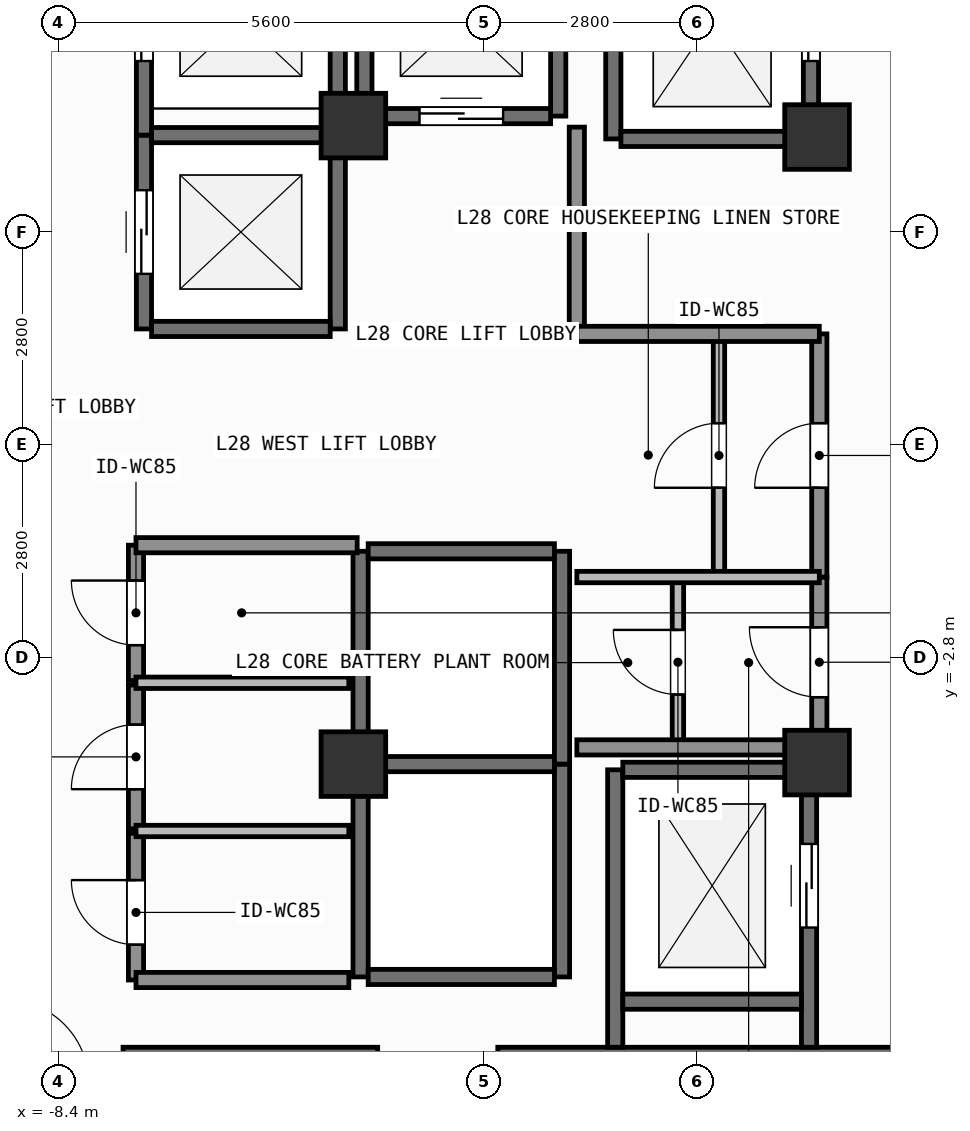
"""IFC4 building model, lengths in metres.
Left out: names, types, materials, properties, quantities, classifications, styles, units other than length and angle.
Written with IfcOpenShell. Run it as: python <this file> out.ifc"""

import sys

from ifc_helpers import new_model, si_unit, direction, frame, frame_2d, origin, origin_2d, place, context, subcontext, project, spatial, rectangle, extrude, element, fill, save


model = new_model("IFC4")
c1 = context("Model", 3, precision=1e-05, world=origin(), true_north=direction((0.0, 1.0)))
c2 = subcontext(c1, "Body", "Model", "MODEL_VIEW")
j1 = project(units=[si_unit("LENGTHUNIT", "METRE"), si_unit("PLANEANGLEUNIT", "RADIAN")], contexts=[c1])
p1 = place(None, origin())
s1 = spatial("IfcSite", under=j1, at=p1, CompositionType="ELEMENT")
p2 = place(p1, origin())
s2 = spatial("IfcBuilding", under=s1, at=p2, CompositionType="ELEMENT")
p3 = place(p2, frame((0.0, 0.0, 113.4)))
s3 = spatial("IfcBuildingStorey", under=s2, at=p3, CompositionType="ELEMENT", Elevation=113.4)
p4 = place(p3, frame((-7.55, -8.4, 0.0), z_axis=(0.0, 0.0, 1.0), x_axis=(1.0, 0.0, 0.0)))
e1 = element("IfcWall", 1, at=p4, inside=s3, PredefinedType="SHEAR", context=c2, shape_type="SweptSolid", body=[
    extrude(rectangle(XDim=3.35, YDim=0.95, at=frame_2d((1.675, 0.0))), origin(), (0.0, 0.0, 1.0), 3.9),
])
p5 = place(p3, frame((-2.62, -8.4, 0.0), z_axis=(0.0, 0.0, 1.0), x_axis=(1.0, 0.0, 0.0)))
e2 = element("IfcWall", 2, at=p5, inside=s3, PredefinedType="SHEAR", context=c2, shape_type="SweptSolid", body=[
    extrude(rectangle(XDim=7.27, YDim=0.95, at=frame_2d((3.635, 0.0))), origin(), (0.0, 0.0, 1.0), 3.9),
])
for number, where, z_axis, x_axis in (
    (3, (-4.52, -4.2, 0.0), (0.0, 0.0, 1.0), (1.0, 0.0, 0.0)),
    (4, (1.58, -4.18, 0.0), (0.0, 0.0, 1.0), (1.0, 0.0, 0.0)),
    (5, (1.58, 4.05, 0.0), (0.0, 0.0, 1.0), (1.0, 0.0, 0.0)),
    (6, (-4.52, 4.2, 0.0), (0.0, 0.0, 1.0), (1.0, 0.0, 0.0)),
):
    element("IfcColumn", number, at=place(p3, frame(where, z_axis=z_axis, x_axis=x_axis)), inside=s3, PredefinedType="COLUMN", context=c2, shape_type="SweptSolid", body=[
        extrude(rectangle(XDim=0.85, YDim=0.85, at=origin_2d()), origin(), (0.0, 0.0, 1.0), 3.9),
    ])
p6 = place(p3, frame((-7.275, 1.525, 0.0), z_axis=(0.0, 0.0, 1.0), x_axis=(0.0, 1.0, 0.0)))
e7 = element("IfcWall", 7, at=p6, inside=s3, PredefinedType="SHEAR", context=c2, shape_type="SweptSolid", body=[
    extrude(rectangle(XDim=2.55, YDim=0.2, at=frame_2d((1.275, 0.0))), origin(), (0.0, 0.0, 1.0), 3.68),
])
p7 = place(p6, frame((0.725, 0.0, 0.0)))
e8 = element("IfcOpeningElement", 8, at=p7, cuts=e7, PredefinedType="OPENING", context=c2, shape_type="SweptSolid", body=[
    extrude(rectangle(XDim=1.1, YDim=2.2, at=frame_2d((0.55, 1.1))), frame((0.0, 0.11, 0.0), z_axis=(0.0, -1.0, 0.0), x_axis=(1.0, 0.0, 0.0)), (0.0, 0.0, 1.0), 0.22),
])
p8 = place(p3, frame((-4.725, 1.525, 0.0), z_axis=(0.0, 0.0, 1.0), x_axis=(0.0, 1.0, 0.0)))
e9 = element("IfcWall", 9, at=p8, inside=s3, PredefinedType="SHEAR", context=c2, shape_type="SweptSolid", body=[
    extrude(rectangle(XDim=2.55, YDim=0.2, at=frame_2d((1.275, 0.0))), origin(), (0.0, 0.0, 1.0), 3.68),
])
for number, where, z_axis, x_axis in (
    (10, (-7.175, 1.525, 0.0), (0.0, 0.0, 1.0), (1.0, 0.0, 0.0)),
    (11, (-7.175, 4.075, 0.0), (0.0, 0.0, 1.0), (1.0, 0.0, 0.0)),
):
    element("IfcWall", number, at=place(p3, frame(where, z_axis=z_axis, x_axis=x_axis)), inside=s3, PredefinedType="SHEAR", context=c2, shape_type="SweptSolid", body=[
        extrude(rectangle(XDim=2.35, YDim=0.2, at=frame_2d((1.175, 0.0))), origin(), (0.0, 0.0, 1.0), 3.68),
    ])
p9 = place(p3, frame((-7.275, 4.075, 0.0), z_axis=(0.0, 0.0, 1.0), x_axis=(0.0, 1.0, 0.0)))
e12 = element("IfcWall", 12, at=p9, inside=s3, PredefinedType="SHEAR", context=c2, shape_type="SweptSolid", body=[
    extrude(rectangle(XDim=2.8, YDim=0.2, at=frame_2d((1.4, 0.0))), origin(), (0.0, 0.0, 1.0), 3.68),
])
p10 = place(p9, frame((0.975, 0.0, 0.0)))
e13 = element("IfcOpeningElement", 13, at=p10, cuts=e12, PredefinedType="OPENING", context=c2, shape_type="SweptSolid", body=[
    extrude(rectangle(XDim=1.1, YDim=2.2, at=frame_2d((0.55, 1.1))), frame((0.0, 0.11, 0.0), z_axis=(0.0, -1.0, 0.0), x_axis=(1.0, 0.0, 0.0)), (0.0, 0.0, 1.0), 0.22),
])
p11 = place(p3, frame((-4.725, 4.075, 0.0), z_axis=(0.0, 0.0, 1.0), x_axis=(0.0, 1.0, 0.0)))
e14 = element("IfcWall", 14, at=p11, inside=s3, PredefinedType="SHEAR", context=c2, shape_type="SweptSolid", body=[
    extrude(rectangle(XDim=2.8, YDim=0.2, at=frame_2d((1.4, 0.0))), origin(), (0.0, 0.0, 1.0), 3.68),
])
for number, where, z_axis, x_axis in (
    (15, (-4.375, 4.325, 0.0), (0.0, 0.0, 1.0), (0.0, 1.0, 0.0)),
    (16, (-1.825, 4.325, 0.0), (0.0, 0.0, 1.0), (0.0, 1.0, 0.0)),
):
    element("IfcWall", number, at=place(p3, frame(where, z_axis=z_axis, x_axis=x_axis)), inside=s3, PredefinedType="SHEAR", context=c2, shape_type="SweptSolid", body=[
        extrude(rectangle(XDim=2.55, YDim=0.2, at=frame_2d((1.275, 0.0))), origin(), (0.0, 0.0, 1.0), 3.68),
    ])
p12 = place(p3, frame((-4.275, 4.325, 0.0), z_axis=(0.0, 0.0, 1.0), x_axis=(1.0, 0.0, 0.0)))
e17 = element("IfcWall", 17, at=p12, inside=s3, PredefinedType="SHEAR", context=c2, shape_type="SweptSolid", body=[
    extrude(rectangle(XDim=2.35, YDim=0.2, at=frame_2d((1.175, 0.0))), origin(), (0.0, 0.0, 1.0), 3.68),
])
p13 = place(p12, frame((0.625, 0.0, 0.0)))
e18 = element("IfcOpeningElement", 18, at=p13, cuts=e17, PredefinedType="OPENING", context=c2, shape_type="SweptSolid", body=[
    extrude(rectangle(XDim=1.1, YDim=2.2, at=frame_2d((0.55, 1.1))), frame((0.0, 0.11, 0.0), z_axis=(0.0, -1.0, 0.0), x_axis=(1.0, 0.0, 0.0)), (0.0, 0.0, 1.0), 0.22),
])
for number, where, z_axis, x_axis in (
    (19, (-4.425, -7.0, 0.0), (0.0, 0.0, 1.0), (0.0, 1.0, 0.0)),
    (20, (-1.775, -7.0, 0.0), (0.0, 0.0, 1.0), (0.0, 1.0, 0.0)),
):
    element("IfcWall", number, at=place(p3, frame(where, z_axis=z_axis, x_axis=x_axis)), inside=s3, PredefinedType="SHEAR", context=c2, shape_type="SweptSolid", body=[
        extrude(rectangle(XDim=2.8, YDim=0.2, at=frame_2d((1.4, 0.0))), origin(), (0.0, 0.0, 1.0), 3.68),
    ])
for number, where, z_axis, x_axis in (
    (21, (-4.325, -7.0, 0.0), (0.0, 0.0, 1.0), (1.0, 0.0, 0.0)),
    (22, (-4.325, -4.2, 0.0), (0.0, 0.0, 1.0), (1.0, 0.0, 0.0)),
):
    element("IfcWall", number, at=place(p3, frame(where, z_axis=z_axis, x_axis=x_axis)), inside=s3, PredefinedType="SHEAR", context=c2, shape_type="SweptSolid", body=[
        extrude(rectangle(XDim=2.45, YDim=0.2, at=frame_2d((1.225, 0.0))), origin(), (0.0, 0.0, 1.0), 3.68),
    ])
for number, where, z_axis, x_axis in (
    (23, (-4.425, -4.2, 0.0), (0.0, 0.0, 1.0), (0.0, 1.0, 0.0)),
    (24, (-1.775, -4.2, 0.0), (0.0, 0.0, 1.0), (0.0, 1.0, 0.0)),
):
    element("IfcWall", number, at=place(p3, frame(where, z_axis=z_axis, x_axis=x_axis)), inside=s3, PredefinedType="SHEAR", context=c2, shape_type="SweptSolid", body=[
        extrude(rectangle(XDim=2.8, YDim=0.2, at=frame_2d((1.4, 0.0))), origin(), (0.0, 0.0, 1.0), 3.68),
    ])
p14 = place(p3, frame((-4.325, -1.4, 0.0), z_axis=(0.0, 0.0, 1.0), x_axis=(1.0, 0.0, 0.0)))
e25 = element("IfcWall", 25, at=p14, inside=s3, PredefinedType="SHEAR", context=c2, shape_type="SweptSolid", body=[
    extrude(rectangle(XDim=2.45, YDim=0.2, at=frame_2d((1.225, 0.0))), origin(), (0.0, 0.0, 1.0), 3.68),
])
p15 = place(p3, frame((-1.1, 4.025, 0.0), z_axis=(0.0, 0.0, 1.0), x_axis=(0.0, 1.0, 0.0)))
e26 = element("IfcWall", 26, at=p15, inside=s3, PredefinedType="SHEAR", context=c2, shape_type="SweptSolid", body=[
    extrude(rectangle(XDim=3.15, YDim=0.2, at=frame_2d((1.575, 0.0))), origin(), (0.0, 0.0, 1.0), 3.68),
])
p16 = place(p3, frame((1.5, 4.025, 0.0), z_axis=(0.0, 0.0, 1.0), x_axis=(0.0, 1.0, 0.0)))
e27 = element("IfcWall", 27, at=p16, inside=s3, PredefinedType="SHEAR", context=c2, shape_type="SweptSolid", body=[
    extrude(rectangle(XDim=3.15, YDim=0.2, at=frame_2d((1.575, 0.0))), origin(), (0.0, 0.0, 1.0), 3.68),
])
p17 = place(p16, frame((1.025, 0.0, 0.0)))
e28 = element("IfcOpeningElement", 28, at=p17, cuts=e27, PredefinedType="OPENING", context=c2, shape_type="SweptSolid", body=[
    extrude(rectangle(XDim=1.1, YDim=2.2, at=frame_2d((0.55, 1.1))), frame((0.0, 0.11, 0.0), z_axis=(0.0, -1.0, 0.0), x_axis=(1.0, 0.0, 0.0)), (0.0, 0.0, 1.0), 0.22),
])
p18 = place(p3, frame((-1.0, 4.025, 0.0), z_axis=(0.0, 0.0, 1.0), x_axis=(1.0, 0.0, 0.0)))
e29 = element("IfcWall", 29, at=p18, inside=s3, PredefinedType="SHEAR", context=c2, shape_type="SweptSolid", body=[
    extrude(rectangle(XDim=2.4, YDim=0.2, at=frame_2d((1.2, 0.0))), origin(), (0.0, 0.0, 1.0), 3.68),
])
p19 = place(p3, frame((-1.075, -7.925, 0.0), z_axis=(0.0, 0.0, 1.0), x_axis=(0.0, 1.0, 0.0)))
e30 = element("IfcWall", 30, at=p19, inside=s3, PredefinedType="SHEAR", context=c2, shape_type="SweptSolid", body=[
    extrude(rectangle(XDim=3.65, YDim=0.2, at=frame_2d((1.825, 0.0))), origin(), (0.0, 0.0, 1.0), 3.68),
])
p20 = place(p3, frame((1.475, -7.925, 0.0), z_axis=(0.0, 0.0, 1.0), x_axis=(0.0, 1.0, 0.0)))
e31 = element("IfcWall", 31, at=p20, inside=s3, PredefinedType="SHEAR", context=c2, shape_type="SweptSolid", body=[
    extrude(rectangle(XDim=3.65, YDim=0.2, at=frame_2d((1.825, 0.0))), origin(), (0.0, 0.0, 1.0), 3.68),
])
p21 = place(p20, frame((1.575, 0.0, 0.0)))
e32 = element("IfcOpeningElement", 32, at=p21, cuts=e31, PredefinedType="OPENING", context=c2, shape_type="SweptSolid", body=[
    extrude(rectangle(XDim=1.1, YDim=2.2, at=frame_2d((0.55, 1.1))), frame((0.0, 0.11, 0.0), z_axis=(0.0, -1.0, 0.0), x_axis=(1.0, 0.0, 0.0)), (0.0, 0.0, 1.0), 0.22),
])
for number, where, z_axis, x_axis in (
    (33, (-0.975, -7.325, 0.0), (0.0, 0.0, 1.0), (1.0, 0.0, 0.0)),
    (34, (-0.975, -4.275, 0.0), (0.0, 0.0, 1.0), (1.0, 0.0, 0.0)),
):
    element("IfcWall", number, at=place(p3, frame(where, z_axis=z_axis, x_axis=x_axis)), inside=s3, PredefinedType="SHEAR", context=c2, shape_type="SweptSolid", body=[
        extrude(rectangle(XDim=2.35, YDim=0.2, at=frame_2d((1.175, 0.0))), origin(), (0.0, 0.0, 1.0), 3.68),
    ])
p22 = place(p3, frame((-0.25, -3.98, 0.0), z_axis=(0.0, 0.0, 1.0), x_axis=(0.0, 1.0, 0.0)))
e35 = element("IfcWall", 35, at=p22, inside=s3, PredefinedType="PARTITIONING", context=c2, shape_type="SweptSolid", body=[
    extrude(rectangle(XDim=2.241, YDim=0.15, at=frame_2d((1.121, 0.0))), origin(), (0.0, 0.0, 1.0), 3.68),
])
p23 = place(p22, frame((0.696, 0.0, 0.0)))
e36 = element("IfcOpeningElement", 36, at=p23, cuts=e35, PredefinedType="OPENING", context=c2, shape_type="SweptSolid", body=[
    extrude(rectangle(XDim=0.85, YDim=2.1, at=frame_2d((0.425, 1.05))), frame((0.0, 0.085, 0.0), z_axis=(0.0, -1.0, 0.0), x_axis=(1.0, 0.0, 0.0)), (0.0, 0.0, 1.0), 0.17),
])
p24 = place(p3, frame((0.29, -1.739, 0.0), z_axis=(0.0, 0.0, 1.0), x_axis=(0.0, 1.0, 0.0)))
e37 = element("IfcWall", 37, at=p24, inside=s3, PredefinedType="PARTITIONING", context=c2, shape_type="SweptSolid", body=[
    extrude(rectangle(XDim=3.199, YDim=0.15, at=frame_2d((1.6, 0.0))), origin(), (0.0, 0.0, 1.0), 3.68),
])
p25 = place(p24, frame((1.175, 0.0, 0.0)))
e38 = element("IfcOpeningElement", 38, at=p25, cuts=e37, PredefinedType="OPENING", context=c2, shape_type="SweptSolid", body=[
    extrude(rectangle(XDim=0.85, YDim=2.1, at=frame_2d((0.425, 1.05))), frame((0.0, 0.085, 0.0), z_axis=(0.0, -1.0, 0.0), x_axis=(1.0, 0.0, 0.0)), (0.0, 0.0, 1.0), 0.17),
])
p26 = place(p3, frame((1.61, -3.98, 0.0), z_axis=(0.0, 0.0, 1.0), x_axis=(0.0, 1.0, 0.0)))
e39 = element("IfcWall", 39, at=p26, inside=s3, PredefinedType="SOLIDWALL", context=c2, shape_type="SweptSolid", body=[
    extrude(rectangle(XDim=2.241, YDim=0.2, at=frame_2d((1.121, 0.0))), origin(), (0.0, 0.0, 1.0), 3.68),
])
p27 = place(p26, frame((0.66, 0.0, 0.0)))
e40 = element("IfcOpeningElement", 40, at=p27, cuts=e39, PredefinedType="OPENING", context=c2, shape_type="SweptSolid", body=[
    extrude(rectangle(XDim=0.92, YDim=2.1, at=frame_2d((0.46, 1.05))), frame((0.0, 0.11, 0.0), z_axis=(0.0, -1.0, 0.0), x_axis=(1.0, 0.0, 0.0)), (0.0, 0.0, 1.0), 0.22),
])
p28 = place(p3, frame((1.61, -1.739, 0.0), z_axis=(0.0, 0.0, 1.0), x_axis=(0.0, 1.0, 0.0)))
e41 = element("IfcWall", 41, at=p28, inside=s3, PredefinedType="SOLIDWALL", context=c2, shape_type="SweptSolid", body=[
    extrude(rectangle(XDim=3.199, YDim=0.2, at=frame_2d((1.6, 0.0))), origin(), (0.0, 0.0, 1.0), 3.68),
])
p29 = place(p28, frame((1.175, 0.0, 0.0)))
e42 = element("IfcOpeningElement", 42, at=p29, cuts=e41, PredefinedType="OPENING", context=c2, shape_type="SweptSolid", body=[
    extrude(rectangle(XDim=0.85, YDim=2.1, at=frame_2d((0.425, 1.05))), frame((0.0, 0.11, 0.0), z_axis=(0.0, -1.0, 0.0), x_axis=(1.0, 0.0, 0.0)), (0.0, 0.0, 1.0), 0.22),
])
p30 = place(p3, frame((-7.38, -7.04, 0.0), z_axis=(0.0, 0.0, 1.0), x_axis=(0.0, 1.0, 0.0)))
e43 = element("IfcWall", 43, at=p30, inside=s3, PredefinedType="SOLIDWALL", context=c2, shape_type="SweptSolid", body=[
    extrude(rectangle(XDim=1.93, YDim=0.2, at=frame_2d((0.965, 0.0))), origin(), (0.0, 0.0, 1.0), 3.68),
])
p31 = place(p30, frame((0.464, 0.0, 0.0)))
e44 = element("IfcOpeningElement", 44, at=p31, cuts=e43, PredefinedType="OPENING", context=c2, shape_type="SweptSolid", body=[
    extrude(rectangle(XDim=0.85, YDim=2.1, at=frame_2d((0.425, 1.05))), frame((0.0, 0.11, 0.0), z_axis=(0.0, -1.0, 0.0), x_axis=(1.0, 0.0, 0.0)), (0.0, 0.0, 1.0), 0.22),
])
p32 = place(p3, frame((-7.38, -5.05, 0.0), z_axis=(0.0, 0.0, 1.0), x_axis=(0.0, 1.0, 0.0)))
e45 = element("IfcWall", 45, at=p32, inside=s3, PredefinedType="SOLIDWALL", context=c2, shape_type="SweptSolid", body=[
    extrude(rectangle(XDim=1.89, YDim=0.2, at=frame_2d((0.945, 0.0))), origin(), (0.0, 0.0, 1.0), 3.68),
])
p33 = place(p32, frame((0.52, 0.0, 0.0)))
e46 = element("IfcOpeningElement", 46, at=p33, cuts=e45, PredefinedType="OPENING", context=c2, shape_type="SweptSolid", body=[
    extrude(rectangle(XDim=0.85, YDim=2.1, at=frame_2d((0.425, 1.05))), frame((0.0, 0.11, 0.0), z_axis=(0.0, -1.0, 0.0), x_axis=(1.0, 0.0, 0.0)), (0.0, 0.0, 1.0), 0.22),
])
p34 = place(p3, frame((-7.38, -3.1, 0.0), z_axis=(0.0, 0.0, 1.0), x_axis=(0.0, 1.0, 0.0)))
e47 = element("IfcWall", 47, at=p34, inside=s3, PredefinedType="SOLIDWALL", context=c2, shape_type="SweptSolid", body=[
    extrude(rectangle(XDim=1.78, YDim=0.2, at=frame_2d((0.89, 0.0))), origin(), (0.0, 0.0, 1.0), 3.68),
])
p35 = place(p34, frame((0.465, 0.0, 0.0)))
e48 = element("IfcOpeningElement", 48, at=p35, cuts=e47, PredefinedType="OPENING", context=c2, shape_type="SweptSolid", body=[
    extrude(rectangle(XDim=0.85, YDim=2.1, at=frame_2d((0.425, 1.05))), frame((0.0, 0.11, 0.0), z_axis=(0.0, -1.0, 0.0), x_axis=(1.0, 0.0, 0.0)), (0.0, 0.0, 1.0), 0.22),
])
p36 = place(p3, frame((-7.38, -1.32, 0.0), z_axis=(0.0, 0.0, 1.0), x_axis=(1.0, 0.0, 0.0)))
e49 = element("IfcWall", 49, at=p36, inside=s3, PredefinedType="SOLIDWALL", context=c2, shape_type="SweptSolid", body=[
    extrude(rectangle(XDim=2.91, YDim=0.2, at=frame_2d((1.455, 0.0))), origin(), (0.0, 0.0, 1.0), 3.68),
])
p37 = place(p3, frame((-1.58, 1.48, 0.0), z_axis=(0.0, 0.0, 1.0), x_axis=(0.0, 1.0, 0.0)))
e50 = element("IfcWall", 50, at=p37, inside=s3, PredefinedType="SOLIDWALL", context=c2, shape_type="SweptSolid", body=[
    extrude(rectangle(XDim=2.7, YDim=0.2, at=frame_2d((1.35, 0.0))), origin(), (0.0, 0.0, 1.0), 3.68),
])
for number, where, z_axis, x_axis in (
    (51, (-1.58, -3.98, 0.0), (0.0, 0.0, 1.0), (1.0, 0.0, 0.0)),
    (52, (-1.58, 1.46, 0.0), (0.0, 0.0, 1.0), (1.0, 0.0, 0.0)),
):
    element("IfcWall", number, at=place(p3, frame(where, z_axis=z_axis, x_axis=x_axis)), inside=s3, PredefinedType="SOLIDWALL", context=c2, shape_type="SweptSolid", body=[
        extrude(rectangle(XDim=3.19, YDim=0.2, at=frame_2d((1.595, 0.0))), origin(), (0.0, 0.0, 1.0), 3.68),
    ])
p38 = place(p3, frame((-1.58, -1.739, 0.0), z_axis=(0.0, 0.0, 1.0), x_axis=(1.0, 0.0, 0.0)))
e53 = element("IfcWall", 53, at=p38, inside=s3, PredefinedType="PARTITIONING", context=c2, shape_type="SweptSolid", body=[
    extrude(rectangle(XDim=3.19, YDim=0.15, at=frame_2d((1.595, 0.0))), origin(), (0.0, 0.0, 1.0), 3.68),
])
p39 = place(p3, frame((-7.38, -7.04, 0.0), z_axis=(0.0, 0.0, 1.0), x_axis=(1.0, 0.0, 0.0)))
e54 = element("IfcWall", 54, at=p39, inside=s3, PredefinedType="SOLIDWALL", context=c2, shape_type="SweptSolid", body=[
    extrude(rectangle(XDim=2.8, YDim=0.2, at=frame_2d((1.4, 0.0))), origin(), (0.0, 0.0, 1.0), 3.68),
])
for number, where, z_axis, x_axis in (
    (55, (-7.38, -5.08, 0.0), (0.0, 0.0, 1.0), (1.0, 0.0, 0.0)),
    (56, (-7.38, -3.13, 0.0), (0.0, 0.0, 1.0), (1.0, 0.0, 0.0)),
):
    element("IfcWall", number, at=place(p3, frame(where, z_axis=z_axis, x_axis=x_axis)), inside=s3, PredefinedType="PARTITIONING", context=c2, shape_type="SweptSolid", body=[
        extrude(rectangle(XDim=2.8, YDim=0.15, at=frame_2d((1.4, 0.0))), origin(), (0.0, 0.0, 1.0), 3.68),
    ])
p40 = place(p7, origin())
e57 = element("IfcDoor", 57, at=p40, inside=s3, OperationType="SLIDING_TO_LEFT", PredefinedType="DOOR", context=c2, shape_type="SweptSolid", body=[
    extrude(rectangle(XDim=1.1, YDim=2.2, at=frame_2d((0.55, 1.1))), frame((0.0, 0.025, 0.0), z_axis=(0.0, -1.0, 0.0), x_axis=(1.0, 0.0, 0.0)), (0.0, 0.0, 1.0), 0.05),
])
fill(e8, e57)
p41 = place(p10, origin())
e58 = element("IfcDoor", 58, at=p41, inside=s3, OperationType="SLIDING_TO_LEFT", PredefinedType="DOOR", context=c2, shape_type="SweptSolid", body=[
    extrude(rectangle(XDim=1.1, YDim=2.2, at=frame_2d((0.55, 1.1))), frame((0.0, 0.025, 0.0), z_axis=(0.0, -1.0, 0.0), x_axis=(1.0, 0.0, 0.0)), (0.0, 0.0, 1.0), 0.05),
])
fill(e13, e58)
p42 = place(p13, origin())
e59 = element("IfcDoor", 59, at=p42, inside=s3, OperationType="SLIDING_TO_LEFT", PredefinedType="DOOR", context=c2, shape_type="SweptSolid", body=[
    extrude(rectangle(XDim=1.1, YDim=2.2, at=frame_2d((0.55, 1.1))), frame((0.0, 0.025, 0.0), z_axis=(0.0, -1.0, 0.0), x_axis=(1.0, 0.0, 0.0)), (0.0, 0.0, 1.0), 0.05),
])
fill(e18, e59)
p43 = place(p17, origin())
e60 = element("IfcDoor", 60, at=p43, inside=s3, OperationType="SLIDING_TO_LEFT", PredefinedType="DOOR", context=c2, shape_type="SweptSolid", body=[
    extrude(rectangle(XDim=1.1, YDim=2.2, at=frame_2d((0.55, 1.1))), frame((0.0, 0.025, 0.0), z_axis=(0.0, -1.0, 0.0), x_axis=(1.0, 0.0, 0.0)), (0.0, 0.0, 1.0), 0.05),
])
fill(e28, e60)
p44 = place(p21, origin())
e61 = element("IfcDoor", 61, at=p44, inside=s3, OperationType="SLIDING_TO_LEFT", PredefinedType="DOOR", context=c2, shape_type="SweptSolid", body=[
    extrude(rectangle(XDim=1.1, YDim=2.2, at=frame_2d((0.55, 1.1))), frame((0.0, 0.025, 0.0), z_axis=(0.0, -1.0, 0.0), x_axis=(1.0, 0.0, 0.0)), (0.0, 0.0, 1.0), 0.05),
])
fill(e32, e61)
p45 = place(p23, origin())
e62 = element("IfcDoor", 62, at=p45, inside=s3, OperationType="SINGLE_SWING_RIGHT", PredefinedType="DOOR", context=c2, shape_type="SweptSolid", body=[
    extrude(rectangle(XDim=0.85, YDim=2.1, at=frame_2d((0.425, 1.05))), frame((0.0, 0.025, 0.0), z_axis=(0.0, -1.0, 0.0), x_axis=(1.0, 0.0, 0.0)), (0.0, 0.0, 1.0), 0.05),
])
fill(e36, e62)
p46 = place(p25, origin())
e63 = element("IfcDoor", 63, at=p46, inside=s3, OperationType="SINGLE_SWING_LEFT", PredefinedType="DOOR", context=c2, shape_type="SweptSolid", body=[
    extrude(rectangle(XDim=0.85, YDim=2.1, at=frame_2d((0.425, 1.05))), frame((0.0, 0.025, 0.0), z_axis=(0.0, -1.0, 0.0), x_axis=(1.0, 0.0, 0.0)), (0.0, 0.0, 1.0), 0.05),
])
fill(e38, e63)
p47 = place(p27, origin())
e64 = element("IfcDoor", 64, at=p47, inside=s3, OperationType="SINGLE_SWING_RIGHT", PredefinedType="DOOR", context=c2, shape_type="SweptSolid", body=[
    extrude(rectangle(XDim=0.92, YDim=2.1, at=frame_2d((0.46, 1.05))), frame((0.0, 0.025, 0.0), z_axis=(0.0, -1.0, 0.0), x_axis=(1.0, 0.0, 0.0)), (0.0, 0.0, 1.0), 0.05),
])
fill(e40, e64)
p48 = place(p29, origin())
e65 = element("IfcDoor", 65, at=p48, inside=s3, OperationType="SINGLE_SWING_LEFT", PredefinedType="DOOR", context=c2, shape_type="SweptSolid", body=[
    extrude(rectangle(XDim=0.85, YDim=2.1, at=frame_2d((0.425, 1.05))), frame((0.0, 0.025, 0.0), z_axis=(0.0, -1.0, 0.0), x_axis=(1.0, 0.0, 0.0)), (0.0, 0.0, 1.0), 0.05),
])
fill(e42, e65)
p49 = place(p31, origin())
e66 = element("IfcDoor", 66, at=p49, inside=s3, OperationType="SINGLE_SWING_RIGHT", PredefinedType="DOOR", context=c2, shape_type="SweptSolid", body=[
    extrude(rectangle(XDim=0.85, YDim=2.1, at=frame_2d((0.425, 1.05))), frame((0.0, 0.025, 0.0), z_axis=(0.0, -1.0, 0.0), x_axis=(1.0, 0.0, 0.0)), (0.0, 0.0, 1.0), 0.05),
])
fill(e44, e66)
p50 = place(p33, origin())
e67 = element("IfcDoor", 67, at=p50, inside=s3, OperationType="SINGLE_SWING_LEFT", PredefinedType="DOOR", context=c2, shape_type="SweptSolid", body=[
    extrude(rectangle(XDim=0.85, YDim=2.1, at=frame_2d((0.425, 1.05))), frame((0.0, 0.025, 0.0), z_axis=(0.0, -1.0, 0.0), x_axis=(1.0, 0.0, 0.0)), (0.0, 0.0, 1.0), 0.05),
])
fill(e46, e67)
p51 = place(p35, origin())
e68 = element("IfcDoor", 68, at=p51, inside=s3, OperationType="SINGLE_SWING_RIGHT", PredefinedType="DOOR", context=c2, shape_type="SweptSolid", body=[
    extrude(rectangle(XDim=0.85, YDim=2.1, at=frame_2d((0.425, 1.05))), frame((0.0, 0.025, 0.0), z_axis=(0.0, -1.0, 0.0), x_axis=(1.0, 0.0, 0.0)), (0.0, 0.0, 1.0), 0.05),
])
fill(e48, e68)
save(model, sys.argv[1])
